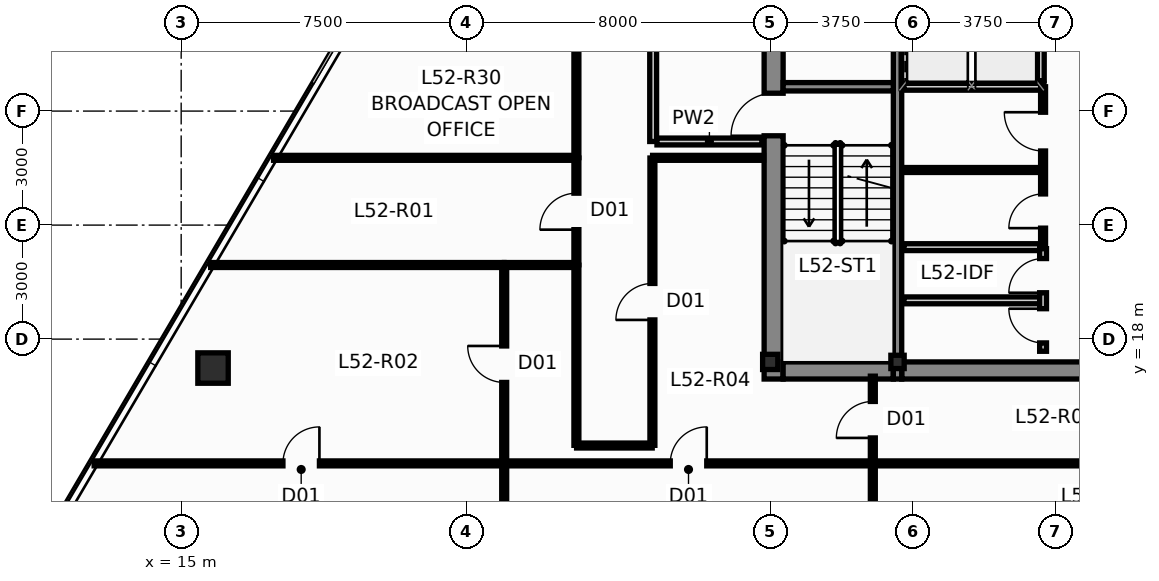
"""IFC4 building model, lengths in metres.
Left out: names, types, materials, properties, quantities, classifications, styles, units other than length and angle.
Written with IfcOpenShell. Run it as: python <this file> out.ifc"""

import sys

from ifc_helpers import new_model, si_unit, direction, frame, frame_2d, origin, origin_2d, place, context, subcontext, project, spatial, rectangle, hollow_rectangle, i_section, extrude, source, transform, mapped, element, fill, save


model = new_model("IFC4")
c1 = context("Model", 3, precision=1e-05, world=origin(), true_north=direction((0.0, 1.0)))
c2 = subcontext(c1, "Body", "Model", "MODEL_VIEW")
j1 = project(units=[si_unit("LENGTHUNIT", "METRE"), si_unit("PLANEANGLEUNIT", "RADIAN")], contexts=[c1])
p1 = place(None, origin())
s1 = spatial("IfcSite", under=j1, at=p1, CompositionType="ELEMENT")
p2 = place(p1, origin())
s2 = spatial("IfcBuilding", under=s1, at=p2, CompositionType="ELEMENT")
p3 = place(p2, frame((0.0, 0.0, 198.65)))
s3 = spatial("IfcBuildingStorey", under=s2, at=p3, CompositionType="ELEMENT", Elevation=198.65)
m1 = source(origin(), c2, "Body", "SweptSolid", [
    extrude(i_section(OverallWidth=0.4, OverallDepth=0.4, WebThickness=0.02, FlangeThickness=0.032, at=origin_2d()), origin(), (0.0, 0.0, 1.0), 3.65),
])
p4 = place(p3, frame((30.5, 17.4, 0.0), z_axis=(0.0, 0.0, 1.0), x_axis=(1.0, 0.0, 0.0)))
e1 = element("IfcColumn", 1, at=p4, inside=s3, PredefinedType="COLUMN", context=c2, shape_type="MappedRepresentation", body=[
    mapped(m1, transform((0.0, 0.0, 0.0), scale=1.0)),
])
m2 = source(origin(), c2, "Body", "SweptSolid", [
    extrude(hollow_rectangle(XDim=0.35, YDim=0.35, WallThickness=0.016, at=origin_2d()), origin(), (0.0, 0.0, 1.0), 3.65),
])
p5 = place(p3, frame((33.85, 17.4, 0.0), z_axis=(0.0, 0.0, 1.0), x_axis=(1.0, 0.0, 0.0)))
e2 = element("IfcColumn", 2, at=p5, inside=s3, PredefinedType="COLUMN", context=c2, shape_type="MappedRepresentation", body=[
    mapped(m2, transform((0.0, 0.0, 0.0), scale=1.0)),
])
p6 = place(p3, frame((30.59, 16.95, 0.0), z_axis=(0.0, 0.0, 1.0), x_axis=(0.0, 1.0, 0.0)))
e3 = element("IfcWall", 3, at=p6, inside=s3, PredefinedType="SHEAR", context=c2, shape_type="SweptSolid", body=[
    extrude(rectangle(XDim=13.275, YDim=0.5, at=frame_2d((6.638, 0.0))), origin(), (0.0, 0.0, 1.0), 3.65),
])
p7 = place(p6, frame((6.4, 0.0, 0.0)))
e4 = element("IfcOpeningElement", 4, at=p7, cuts=e3, PredefinedType="OPENING", context=c2, shape_type="SweptSolid", body=[
    extrude(rectangle(XDim=1.12, YDim=2.15, at=frame_2d((0.56, 1.075))), frame((0.0, 0.262, 0.0), z_axis=(0.0, -1.0, 0.0), x_axis=(1.0, 0.0, 0.0)), (0.0, 0.0, 1.0), 0.524),
])
p8 = place(p6, frame((10.85, 0.0, 0.0)))
e5 = element("IfcOpeningElement", 5, at=p8, cuts=e3, PredefinedType="OPENING", context=c2, shape_type="SweptSolid", body=[
    extrude(rectangle(XDim=1.2, YDim=2.2, at=frame_2d((0.6, 1.1))), frame((0.0, 0.262, 0.0), z_axis=(0.0, -1.0, 0.0), x_axis=(1.0, 0.0, 0.0)), (0.0, 0.0, 1.0), 0.524),
])
p9 = place(p3, frame((30.84, 17.175, 0.0), z_axis=(0.0, 0.0, 1.0), x_axis=(1.0, 0.0, 0.0)))
e6 = element("IfcWall", 6, at=p9, inside=s3, PredefinedType="SHEAR", context=c2, shape_type="SweptSolid", body=[
    extrude(rectangle(XDim=2.9, YDim=0.45, at=frame_2d((1.45, 0.0))), origin(), (0.0, 0.0, 1.0), 3.65),
])
p10 = place(p3, frame((33.96, 17.175, 0.0), z_axis=(0.0, 0.0, 1.0), x_axis=(1.0, 0.0, 0.0)))
e7 = element("IfcWall", 7, at=p10, inside=s3, PredefinedType="SHEAR", context=c2, shape_type="SweptSolid", body=[
    extrude(rectangle(XDim=8.08, YDim=0.45, at=frame_2d((4.04, 0.0))), origin(), (0.0, 0.0, 1.0), 3.65),
])
p11 = place(p3, frame((33.85, 16.95, 0.0), z_axis=(0.0, 0.0, 1.0), x_axis=(0.0, 1.0, 0.0)))
e8 = element("IfcWall", 8, at=p11, inside=s3, PredefinedType="SHEAR", context=c2, shape_type="SweptSolid", body=[
    extrude(rectangle(XDim=13.275, YDim=0.22, at=frame_2d((6.638, 0.0))), origin(), (0.0, 0.0, 1.0), 3.65),
])
p12 = place(p3, frame((30.84, 24.64, 0.0), z_axis=(0.0, 0.0, 1.0), x_axis=(1.0, 0.0, 0.0)))
e9 = element("IfcWall", 9, at=p12, inside=s3, PredefinedType="SHEAR", context=c2, shape_type="SweptSolid", body=[
    extrude(rectangle(XDim=2.9, YDim=0.22, at=frame_2d((1.45, 0.0))), origin(), (0.0, 0.0, 1.0), 3.65),
])
m3 = source(origin(), c2, "Body", "SweptSolid", [
    extrude(hollow_rectangle(XDim=0.8, YDim=0.8, WallThickness=0.045, at=origin_2d()), origin(), (0.0, 0.0, 1.0), 3.651),
])
p13 = place(p3, frame((15.838, 17.239, 0.0), z_axis=(0.010431083049, -0.021597691184, 0.999712324742), x_axis=(0.900476348161, 0.434904985489, 0.0)))
e10 = element("IfcColumn", 10, at=p13, inside=s3, PredefinedType="COLUMN", context=c2, shape_type="MappedRepresentation", body=[
    mapped(m3, transform((0.0, 0.0, 0.0), scale=1.0)),
])
p14 = place(p3, frame((37.62, 24.8, 0.0), z_axis=(0.0, 0.0, 1.0), x_axis=(0.0, 1.0, 0.0)))
e11 = element("IfcWall", 11, at=p14, inside=s3, PredefinedType="PARTITIONING", context=c2, shape_type="SweptSolid", body=[
    extrude(rectangle(XDim=2.0, YDim=0.18, at=frame_2d((1.0, 0.0))), origin(), (0.0, 0.0, 1.0), 3.4),
])
p15 = place(p3, frame((34.02, 24.64, 0.0), z_axis=(0.0, 0.0, 1.0), x_axis=(1.0, 0.0, 0.0)))
e12 = element("IfcWall", 12, at=p15, inside=s3, PredefinedType="PARTITIONING", context=c2, shape_type="SweptSolid", body=[
    extrude(rectangle(XDim=3.68, YDim=0.18, at=frame_2d((1.84, 0.0))), origin(), (0.0, 0.0, 1.0), 3.4),
])
p16 = place(p3, frame((27.42, 23.2, 0.0), z_axis=(0.0, 0.0, 1.0), x_axis=(0.0, 1.0, 0.0)))
e13 = element("IfcWall", 13, at=p16, inside=s3, PredefinedType="PARTITIONING", context=c2, shape_type="SweptSolid", body=[
    extrude(rectangle(XDim=6.4, YDim=0.18, at=frame_2d((3.2, 0.0))), origin(), (0.0, 0.0, 1.0), 3.078),
])
p17 = place(p16, frame((2.65, 0.0, 0.0)))
e14 = element("IfcOpeningElement", 14, at=p17, cuts=e13, PredefinedType="OPENING", context=c2, shape_type="SweptSolid", body=[
    extrude(rectangle(XDim=1.05, YDim=2.15, at=frame_2d((0.525, 1.075))), frame((0.0, 0.102, 0.0), z_axis=(0.0, -1.0, 0.0), x_axis=(1.0, 0.0, 0.0)), (0.0, 0.0, 1.0), 0.204),
])
p18 = place(p3, frame((27.52, 23.2, 0.0), z_axis=(0.0, 0.0, 1.0), x_axis=(1.0, 0.0, 0.0)))
e15 = element("IfcWall", 15, at=p18, inside=s3, PredefinedType="PARTITIONING", context=c2, shape_type="SweptSolid", body=[
    extrude(rectangle(XDim=2.76, YDim=0.18, at=frame_2d((1.38, 0.0))), origin(), (0.0, 0.0, 1.0), 3.4),
])
p19 = place(p3, frame((34.02, 20.42, 0.0), z_axis=(0.0, 0.0, 1.0), x_axis=(1.0, 0.0, 0.0)))
e16 = element("IfcWall", 16, at=p19, inside=s3, PredefinedType="PARTITIONING", context=c2, shape_type="SweptSolid", body=[
    extrude(rectangle(XDim=3.64, YDim=0.18, at=frame_2d((1.82, 0.0))), origin(), (0.0, 0.0, 1.0), 3.4),
])
p20 = place(p3, frame((34.02, 22.45, 0.0), z_axis=(0.0, 0.0, 1.0), x_axis=(1.0, 0.0, 0.0)))
e17 = element("IfcWall", 17, at=p20, inside=s3, PredefinedType="PARTITIONING", context=c2, shape_type="SweptSolid", body=[
    extrude(rectangle(XDim=3.58, YDim=0.13, at=frame_2d((1.79, 0.0))), origin(), (0.0, 0.0, 1.0), 3.4),
])
p21 = place(p3, frame((37.68, 20.5, 0.0), z_axis=(0.0, 0.0, 1.0), x_axis=(0.0, 1.0, 0.0)))
e18 = element("IfcWall", 18, at=p21, inside=s3, PredefinedType="PARTITIONING", context=c2, shape_type="SweptSolid", body=[
    extrude(rectangle(XDim=4.14, YDim=0.13, at=frame_2d((2.07, 0.0))), origin(), (0.0, 0.0, 1.0), 3.4),
])
p22 = place(p21, frame((0.42, 0.0, 0.0)))
e19 = element("IfcOpeningElement", 19, at=p22, cuts=e18, PredefinedType="OPENING", context=c2, shape_type="SweptSolid", body=[
    extrude(rectangle(XDim=0.9, YDim=2.1, at=frame_2d((0.45, 1.05))), frame((0.0, 0.077, 0.0), z_axis=(0.0, -1.0, 0.0), x_axis=(1.0, 0.0, 0.0)), (0.0, 0.0, 1.0), 0.154),
])
p23 = place(p21, frame((2.45, 0.0, 0.0)))
e20 = element("IfcOpeningElement", 20, at=p23, cuts=e18, PredefinedType="OPENING", context=c2, shape_type="SweptSolid", body=[
    extrude(rectangle(XDim=1.02, YDim=2.15, at=frame_2d((0.51, 1.075))), frame((0.0, 0.077, 0.0), z_axis=(0.0, -1.0, 0.0), x_axis=(1.0, 0.0, 0.0)), (0.0, 0.0, 1.0), 0.154),
])
p24 = place(p3, frame((34.02, 19.02, 0.0), z_axis=(0.0, 0.0, 1.0), x_axis=(1.0, 0.0, 0.0)))
e21 = element("IfcWall", 21, at=p24, inside=s3, PredefinedType="PARTITIONING", context=c2, shape_type="SweptSolid", body=[
    extrude(rectangle(XDim=3.58, YDim=0.18, at=frame_2d((1.79, 0.0))), origin(), (0.0, 0.0, 1.0), 3.4),
])
p25 = place(p3, frame((37.68, 17.68, 0.0), z_axis=(0.0, 0.0, 1.0), x_axis=(0.0, 1.0, 0.0)))
e22 = element("IfcWall", 22, at=p25, inside=s3, PredefinedType="PARTITIONING", context=c2, shape_type="SweptSolid", body=[
    extrude(rectangle(XDim=2.7, YDim=0.18, at=frame_2d((1.35, 0.0))), origin(), (0.0, 0.0, 1.0), 3.4),
])
p26 = place(p25, frame((0.22, 0.0, 0.0)))
e23 = element("IfcOpeningElement", 23, at=p26, cuts=e22, PredefinedType="OPENING", context=c2, shape_type="SweptSolid", body=[
    extrude(rectangle(XDim=0.9, YDim=2.1, at=frame_2d((0.45, 1.05))), frame((0.0, 0.102, 0.0), z_axis=(0.0, -1.0, 0.0), x_axis=(1.0, 0.0, 0.0)), (0.0, 0.0, 1.0), 0.204),
])
p27 = place(p25, frame((1.54, 0.0, 0.0)))
e24 = element("IfcOpeningElement", 24, at=p27, cuts=e22, PredefinedType="OPENING", context=c2, shape_type="SweptSolid", body=[
    extrude(rectangle(XDim=0.9, YDim=2.1, at=frame_2d((0.45, 1.05))), frame((0.0, 0.102, 0.0), z_axis=(0.0, -1.0, 0.0), x_axis=(1.0, 0.0, 0.0)), (0.0, 0.0, 1.0), 0.204),
])
p28 = place(p3, frame((12.71, 14.73, 0.0), z_axis=(0.0, 0.0, 1.0), x_axis=(1.0, 0.0, 0.0)))
e25 = element("IfcWall", 25, at=p28, inside=s3, PredefinedType="PARTITIONING", context=c2, shape_type="SweptSolid", body=[
    extrude(rectangle(XDim=10.785, YDim=0.13, at=frame_2d((5.393, 0.0))), origin(), (0.0, 0.0, 1.0), 3.4),
])
p29 = place(p28, frame((4.968, 0.0, 0.0)))
e26 = element("IfcOpeningElement", 26, at=p29, cuts=e25, PredefinedType="OPENING", context=c2, shape_type="SweptSolid", body=[
    extrude(rectangle(XDim=0.96, YDim=2.15, at=frame_2d((0.48, 1.075))), frame((0.0, 0.077, 0.0), z_axis=(0.0, -1.0, 0.0), x_axis=(1.0, 0.0, 0.0)), (0.0, 0.0, 1.0), 0.154),
])
p30 = place(p3, frame((23.505, 14.73, 0.0), z_axis=(0.0, 0.0, 1.0), x_axis=(1.0, 0.0, 0.0)))
e27 = element("IfcWall", 27, at=p30, inside=s3, PredefinedType="PARTITIONING", context=c2, shape_type="SweptSolid", body=[
    extrude(rectangle(XDim=9.69, YDim=0.13, at=frame_2d((4.845, 0.0))), origin(), (0.0, 0.0, 1.0), 3.078),
])
p31 = place(p30, frame((4.365, 0.0, 0.0)))
e28 = element("IfcOpeningElement", 28, at=p31, cuts=e27, PredefinedType="OPENING", context=c2, shape_type="SweptSolid", body=[
    extrude(rectangle(XDim=0.96, YDim=2.15, at=frame_2d((0.48, 1.075))), frame((0.0, 0.077, 0.0), z_axis=(0.0, -1.0, 0.0), x_axis=(1.0, 0.0, 0.0)), (0.0, 0.0, 1.0), 0.154),
])
p32 = place(p3, frame((33.205, 14.73, 0.0), z_axis=(0.0, 0.0, 1.0), x_axis=(1.0, 0.0, 0.0)))
e29 = element("IfcWall", 29, at=p32, inside=s3, PredefinedType="PARTITIONING", context=c2, shape_type="SweptSolid", body=[
    extrude(rectangle(XDim=9.59, YDim=0.13, at=frame_2d((4.795, 0.0))), origin(), (0.0, 0.0, 1.0), 3.078),
])
p33 = place(p3, frame((17.431, 22.77, 0.0), z_axis=(0.0, 0.0, 1.0), x_axis=(1.0, 0.0, 0.0)))
e30 = element("IfcWall", 30, at=p33, inside=s3, PredefinedType="PARTITIONING", context=c2, shape_type="SweptSolid", body=[
    extrude(rectangle(XDim=7.964, YDim=0.13, at=frame_2d((3.982, 0.0))), origin(), (0.0, 0.0, 1.0), 3.4),
])
p34 = place(p3, frame((15.775, 19.95, 0.0), z_axis=(0.0, 0.0, 1.0), x_axis=(1.0, 0.0, 0.0)))
e31 = element("IfcWall", 31, at=p34, inside=s3, PredefinedType="PARTITIONING", context=c2, shape_type="SweptSolid", body=[
    extrude(rectangle(XDim=7.72, YDim=0.13, at=frame_2d((3.86, 0.0))), origin(), (0.0, 0.0, 1.0), 3.4),
])
p35 = place(p3, frame((27.4, 15.205, 0.0), z_axis=(0.0, 0.0, 1.0), x_axis=(0.0, 1.0, 0.0)))
e32 = element("IfcWall", 32, at=p35, inside=s3, PredefinedType="PARTITIONING", context=c2, shape_type="SweptSolid", body=[
    extrude(rectangle(XDim=7.56, YDim=0.13, at=frame_2d((3.78, 0.0))), origin(), (0.0, 0.0, 1.0), 3.4),
])
p36 = place(p35, frame((3.3, 0.0, 0.0)))
e33 = element("IfcOpeningElement", 33, at=p36, cuts=e32, PredefinedType="OPENING", context=c2, shape_type="SweptSolid", body=[
    extrude(rectangle(XDim=0.96, YDim=2.15, at=frame_2d((0.48, 1.075))), frame((0.0, 0.077, 0.0), z_axis=(0.0, -1.0, 0.0), x_axis=(1.0, 0.0, 0.0)), (0.0, 0.0, 1.0), 0.154),
])
p37 = place(p3, frame((25.4, 30.095, 0.0), z_axis=(0.0, 0.0, 1.0), x_axis=(0.0, -1.0, 0.0)))
e34 = element("IfcWall", 34, at=p37, inside=s3, PredefinedType="PARTITIONING", context=c2, shape_type="SweptSolid", body=[
    extrude(rectangle(XDim=7.32, YDim=0.13, at=frame_2d((3.66, 0.0))), origin(), (0.0, 0.0, 1.0), 3.078),
])
p38 = place(p37, frame((3.18, 0.0, 0.0)))
e35 = element("IfcOpeningElement", 35, at=p38, cuts=e34, PredefinedType="OPENING", context=c2, shape_type="SweptSolid", body=[
    extrude(rectangle(XDim=0.96, YDim=2.15, at=frame_2d((0.48, 1.075))), frame((0.0, 0.077, 0.0), z_axis=(0.0, -1.0, 0.0), x_axis=(1.0, 0.0, 0.0)), (0.0, 0.0, 1.0), 0.154),
])
p39 = place(p3, frame((23.5, 14.735, 0.0), z_axis=(0.0, 0.0, 1.0), x_axis=(0.0, 1.0, 0.0)))
e36 = element("IfcWall", 36, at=p39, inside=s3, PredefinedType="PARTITIONING", context=c2, shape_type="SweptSolid", body=[
    extrude(rectangle(XDim=5.21, YDim=0.13, at=frame_2d((2.605, 0.0))), origin(), (0.0, 0.0, 1.0), 3.078),
])
p40 = place(p39, frame((2.125, 0.0, 0.0)))
e37 = element("IfcOpeningElement", 37, at=p40, cuts=e36, PredefinedType="OPENING", context=c2, shape_type="SweptSolid", body=[
    extrude(rectangle(XDim=0.96, YDim=2.15, at=frame_2d((0.48, 1.075))), frame((0.0, 0.077, 0.0), z_axis=(0.0, -1.0, 0.0), x_axis=(1.0, 0.0, 0.0)), (0.0, 0.0, 1.0), 0.154),
])
p41 = place(p3, frame((25.4, 19.945, 0.0), z_axis=(0.0, 0.0, 1.0), x_axis=(0.0, -1.0, 0.0)))
e38 = element("IfcWall", 38, at=p41, inside=s3, PredefinedType="PARTITIONING", context=c2, shape_type="SweptSolid", body=[
    extrude(rectangle(XDim=4.74, YDim=0.13, at=frame_2d((2.37, 0.0))), origin(), (0.0, 0.0, 1.0), 3.078),
])
for number, where, z_axis, x_axis in (
    (39, (23.5, 10.715, 0.0), (0.0, 0.0, 1.0), (0.0, 1.0, 0.0)),
    (40, (33.2, 10.715, 0.0), (0.0, 0.0, 1.0), (0.0, 1.0, 0.0)),
):
    element("IfcWall", number, at=place(p3, frame(where, z_axis=z_axis, x_axis=x_axis)), inside=s3, PredefinedType="PARTITIONING", context=c2, shape_type="SweptSolid", body=[
        extrude(rectangle(XDim=4.01, YDim=0.13, at=frame_2d((2.005, 0.0))), origin(), (0.0, 0.0, 1.0), 3.4),
    ])
p42 = place(p3, frame((27.405, 22.77, 0.0), z_axis=(0.0, 0.0, 1.0), x_axis=(1.0, 0.0, 0.0)))
e41 = element("IfcWall", 41, at=p42, inside=s3, PredefinedType="PARTITIONING", context=c2, shape_type="SweptSolid", body=[
    extrude(rectangle(XDim=2.92, YDim=0.13, at=frame_2d((1.46, 0.0))), origin(), (0.0, 0.0, 1.0), 3.4),
])
p43 = place(p3, frame((25.4, 19.955, 0.0), z_axis=(0.0, 0.0, 1.0), x_axis=(0.0, 1.0, 0.0)))
e42 = element("IfcWall", 42, at=p43, inside=s3, PredefinedType="PARTITIONING", context=c2, shape_type="SweptSolid", body=[
    extrude(rectangle(XDim=2.81, YDim=0.13, at=frame_2d((1.405, 0.0))), origin(), (0.0, 0.0, 1.0), 3.4),
])
p44 = place(p43, frame((0.925, 0.0, 0.0)))
e43 = element("IfcOpeningElement", 43, at=p44, cuts=e42, PredefinedType="OPENING", context=c2, shape_type="SweptSolid", body=[
    extrude(rectangle(XDim=0.96, YDim=2.15, at=frame_2d((0.48, 1.075))), frame((0.0, 0.077, 0.0), z_axis=(0.0, -1.0, 0.0), x_axis=(1.0, 0.0, 0.0)), (0.0, 0.0, 1.0), 0.154),
])
p45 = place(p3, frame((33.2, 14.735, 0.0), z_axis=(0.0, 0.0, 1.0), x_axis=(0.0, 1.0, 0.0)))
e44 = element("IfcWall", 44, at=p45, inside=s3, PredefinedType="PARTITIONING", context=c2, shape_type="SweptSolid", body=[
    extrude(rectangle(XDim=2.29, YDim=0.13, at=frame_2d((1.145, 0.0))), origin(), (0.0, 0.0, 1.0), 3.4),
])
p46 = place(p45, frame((0.665, 0.0, 0.0)))
e45 = element("IfcOpeningElement", 45, at=p46, cuts=e44, PredefinedType="OPENING", context=c2, shape_type="SweptSolid", body=[
    extrude(rectangle(XDim=0.96, YDim=2.15, at=frame_2d((0.48, 1.075))), frame((0.0, 0.077, 0.0), z_axis=(0.0, -1.0, 0.0), x_axis=(1.0, 0.0, 0.0)), (0.0, 0.0, 1.0), 0.154),
])
p47 = place(p3, frame((25.405, 15.2, 0.0), z_axis=(0.0, 0.0, 1.0), x_axis=(1.0, 0.0, 0.0)))
e46 = element("IfcWall", 46, at=p47, inside=s3, PredefinedType="PARTITIONING", context=c2, shape_type="SweptSolid", body=[
    extrude(rectangle(XDim=1.99, YDim=0.13, at=frame_2d((0.995, 0.0))), origin(), (0.0, 0.0, 1.0), 3.4),
])
p48 = place(p3, frame((23.505, 19.95, 0.0), z_axis=(0.0, 0.0, 1.0), x_axis=(1.0, 0.0, 0.0)))
e47 = element("IfcWall", 47, at=p48, inside=s3, PredefinedType="PARTITIONING", context=c2, shape_type="SweptSolid", body=[
    extrude(rectangle(XDim=1.89, YDim=0.13, at=frame_2d((0.945, 0.0))), origin(), (0.0, 0.0, 1.0), 3.4),
])
p49 = place(p7, origin())
e48 = element("IfcDoor", 48, at=p49, inside=s3, OperationType="SINGLE_SWING_LEFT", PredefinedType="DOOR", context=c2, shape_type="SweptSolid", body=[
    extrude(rectangle(XDim=1.12, YDim=2.15, at=frame_2d((0.56, 1.075))), frame((0.0, 0.025, 0.0), z_axis=(0.0, -1.0, 0.0), x_axis=(1.0, 0.0, 0.0)), (0.0, 0.0, 1.0), 0.05),
])
fill(e4, e48)
p50 = place(p22, origin())
e49 = element("IfcDoor", 49, at=p50, inside=s3, OperationType="SINGLE_SWING_LEFT", PredefinedType="DOOR", context=c2, shape_type="SweptSolid", body=[
    extrude(rectangle(XDim=0.9, YDim=2.1, at=frame_2d((0.45, 1.05))), frame((0.0, 0.025, 0.0), z_axis=(0.0, -1.0, 0.0), x_axis=(1.0, 0.0, 0.0)), (0.0, 0.0, 1.0), 0.05),
])
fill(e19, e49)
p51 = place(p23, origin())
e50 = element("IfcDoor", 50, at=p51, inside=s3, OperationType="SINGLE_SWING_RIGHT", PredefinedType="DOOR", context=c2, shape_type="SweptSolid", body=[
    extrude(rectangle(XDim=1.02, YDim=2.15, at=frame_2d((0.51, 1.075))), frame((0.0, 0.025, 0.0), z_axis=(0.0, -1.0, 0.0), x_axis=(1.0, 0.0, 0.0)), (0.0, 0.0, 1.0), 0.05),
])
fill(e20, e50)
p52 = place(p26, origin())
e51 = element("IfcDoor", 51, at=p52, inside=s3, OperationType="SINGLE_SWING_RIGHT", PredefinedType="DOOR", context=c2, shape_type="SweptSolid", body=[
    extrude(rectangle(XDim=0.9, YDim=2.1, at=frame_2d((0.45, 1.05))), frame((0.0, 0.025, 0.0), z_axis=(0.0, -1.0, 0.0), x_axis=(1.0, 0.0, 0.0)), (0.0, 0.0, 1.0), 0.05),
])
fill(e23, e51)
p53 = place(p27, origin())
e52 = element("IfcDoor", 52, at=p53, inside=s3, OperationType="SINGLE_SWING_LEFT", PredefinedType="DOOR", context=c2, shape_type="SweptSolid", body=[
    extrude(rectangle(XDim=0.9, YDim=2.1, at=frame_2d((0.45, 1.05))), frame((0.0, 0.025, 0.0), z_axis=(0.0, -1.0, 0.0), x_axis=(1.0, 0.0, 0.0)), (0.0, 0.0, 1.0), 0.05),
])
fill(e24, e52)
p54 = place(p29, origin())
e53 = element("IfcDoor", 53, at=p54, inside=s3, OperationType="SINGLE_SWING_RIGHT", PredefinedType="DOOR", context=c2, shape_type="SweptSolid", body=[
    extrude(rectangle(XDim=0.96, YDim=2.15, at=frame_2d((0.48, 1.075))), frame((0.0, 0.025, 0.0), z_axis=(0.0, -1.0, 0.0), x_axis=(1.0, 0.0, 0.0)), (0.0, 0.0, 1.0), 0.05),
])
fill(e26, e53)
p55 = place(p31, origin())
e54 = element("IfcDoor", 54, at=p55, inside=s3, OperationType="SINGLE_SWING_RIGHT", PredefinedType="DOOR", context=c2, shape_type="SweptSolid", body=[
    extrude(rectangle(XDim=0.96, YDim=2.15, at=frame_2d((0.48, 1.075))), frame((0.0, 0.025, 0.0), z_axis=(0.0, -1.0, 0.0), x_axis=(1.0, 0.0, 0.0)), (0.0, 0.0, 1.0), 0.05),
])
fill(e28, e54)
p56 = place(p36, origin())
e55 = element("IfcDoor", 55, at=p56, inside=s3, OperationType="SINGLE_SWING_LEFT", PredefinedType="DOOR", context=c2, shape_type="SweptSolid", body=[
    extrude(rectangle(XDim=0.96, YDim=2.15, at=frame_2d((0.48, 1.075))), frame((0.0, 0.025, 0.0), z_axis=(0.0, -1.0, 0.0), x_axis=(1.0, 0.0, 0.0)), (0.0, 0.0, 1.0), 0.05),
])
fill(e33, e55)
p57 = place(p40, origin())
e56 = element("IfcDoor", 56, at=p57, inside=s3, OperationType="SINGLE_SWING_RIGHT", PredefinedType="DOOR", context=c2, shape_type="SweptSolid", body=[
    extrude(rectangle(XDim=0.96, YDim=2.15, at=frame_2d((0.48, 1.075))), frame((0.0, 0.025, 0.0), z_axis=(0.0, -1.0, 0.0), x_axis=(1.0, 0.0, 0.0)), (0.0, 0.0, 1.0), 0.05),
])
fill(e37, e56)
p58 = place(p44, origin())
e57 = element("IfcDoor", 57, at=p58, inside=s3, OperationType="SINGLE_SWING_LEFT", PredefinedType="DOOR", context=c2, shape_type="SweptSolid", body=[
    extrude(rectangle(XDim=0.96, YDim=2.15, at=frame_2d((0.48, 1.075))), frame((0.0, 0.025, 0.0), z_axis=(0.0, -1.0, 0.0), x_axis=(1.0, 0.0, 0.0)), (0.0, 0.0, 1.0), 0.05),
])
fill(e43, e57)
p59 = place(p46, origin())
e58 = element("IfcDoor", 58, at=p59, inside=s3, OperationType="SINGLE_SWING_LEFT", PredefinedType="DOOR", context=c2, shape_type="SweptSolid", body=[
    extrude(rectangle(XDim=0.96, YDim=2.15, at=frame_2d((0.48, 1.075))), frame((0.0, 0.025, 0.0), z_axis=(0.0, -1.0, 0.0), x_axis=(1.0, 0.0, 0.0)), (0.0, 0.0, 1.0), 0.05),
])
fill(e45, e58)
save(model, sys.argv[1])
